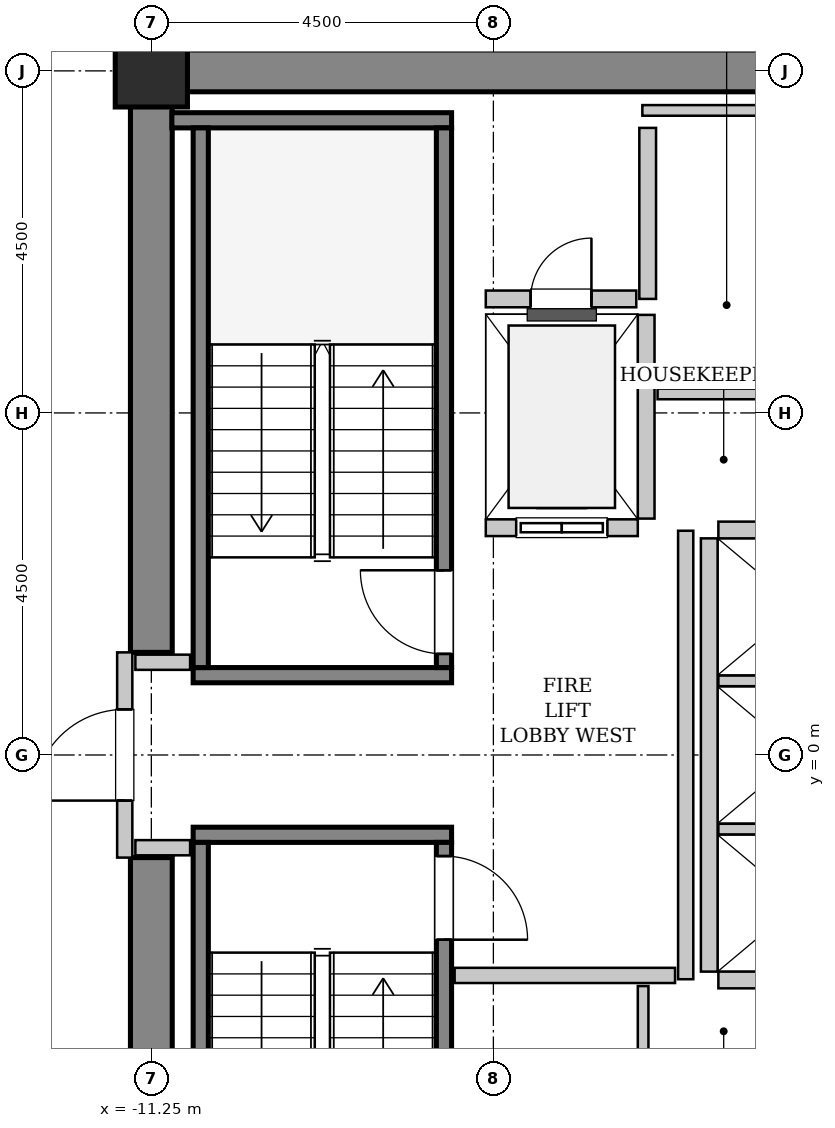
"""IFC4 building model, lengths in metres.
Left out: names, types, materials, properties, quantities, classifications, styles, units other than length and angle.
Written with IfcOpenShell. Run it as: python <this file> out.ifc"""

import sys

from ifc_helpers import new_model, si_unit, direction, frame, frame_2d, origin, origin_2d, place, context, subcontext, project, spatial, rectangle, hollow_rectangle, extrude, source, transform, mapped, element, fill, save


model = new_model("IFC4")
c1 = context("Model", 3, precision=1e-05, world=origin(), true_north=direction((0.0, 1.0)))
c2 = subcontext(c1, "Body", "Model", "MODEL_VIEW")
j1 = project(units=[si_unit("LENGTHUNIT", "METRE"), si_unit("PLANEANGLEUNIT", "RADIAN")], contexts=[c1])
p1 = place(None, origin())
s1 = spatial("IfcSite", under=j1, at=p1, CompositionType="ELEMENT")
p2 = place(p1, origin())
s2 = spatial("IfcBuilding", under=s1, at=p2, CompositionType="ELEMENT")
p3 = place(p2, frame((0.0, 0.0, 171.6)))
s3 = spatial("IfcBuildingStorey", under=s2, at=p3, CompositionType="ELEMENT", Elevation=171.6)
m1 = source(origin(), c2, "Body", "SweptSolid", [
    extrude(rectangle(XDim=9.975, YDim=0.55, at=frame_2d((4.987, 0.0))), origin(), (0.0, 0.0, 1.0), 3.8),
])
p4 = place(p3, frame((-11.525, 9.0, 0.0), z_axis=(0.0, 0.0, 1.0), x_axis=(1.0, 0.0, 0.0)))
e1 = element("IfcWall", 1, at=p4, inside=s3, PredefinedType="SHEAR", context=c2, shape_type="MappedRepresentation", body=[
    mapped(m1, transform((0.0, 0.0, 0.0), x_axis=(1.0, 0.0, 0.0), y_axis=(0.0, 1.0, 0.0), z_axis=(0.0, 0.0, 1.0), scale=1.0)),
])
m2 = source(origin(), c2, "Body", "SweptSolid", [
    extrude(rectangle(XDim=7.375, YDim=0.55, at=frame_2d((3.688, 0.0))), origin(), (0.0, 0.0, 1.0), 3.8),
])
for number, where, z_axis, x_axis in (
    (2, (-11.25, -8.725, 0.0), (0.0, 0.0, 1.0), (0.0, 1.0, 0.0)),
    (3, (-11.25, 1.35, 0.0), (0.0, 0.0, 1.0), (0.0, 1.0, 0.0)),
):
    element("IfcWall", number, at=place(p3, frame(where, z_axis=z_axis, x_axis=x_axis)), inside=s3, PredefinedType="SHEAR", context=c2, shape_type="MappedRepresentation", body=[
        mapped(m2, transform((0.0, 0.0, 0.0), x_axis=(1.0, 0.0, 0.0), y_axis=(0.0, 1.0, 0.0), z_axis=(0.0, 0.0, 1.0), scale=1.0)),
    ])
m3 = source(origin(), c2, "Body", "SweptSolid", [
    extrude(hollow_rectangle(XDim=0.95, YDim=0.95, WallThickness=0.045, InnerFilletRadius=0.045, OuterFilletRadius=0.09, at=origin_2d()), origin(), (0.0, 0.0, 1.0), 3.8),
])
p5 = place(p3, frame((-11.25, 9.0, 0.0), z_axis=(0.0, 0.0, 1.0), x_axis=(1.0, 0.0, 0.0)))
e4 = element("IfcColumn", 4, at=p5, inside=s3, PredefinedType="COLUMN", context=c2, shape_type="MappedRepresentation", body=[
    mapped(m3, transform((0.0, 0.0, 0.0), x_axis=(1.0, 0.0, 0.0), y_axis=(0.0, 1.0, 0.0), z_axis=(0.0, 0.0, 1.0), scale=1.0)),
])
m4 = source(origin(), c2, "Body", "SweptSolid", [
    extrude(rectangle(XDim=3.4, YDim=0.2, at=frame_2d((1.7, 0.0))), origin(), (0.0, 0.0, 1.0), 3.8),
])
p6 = place(p3, frame((-7.3, 1.05, 0.0), z_axis=(0.0, 0.0, 1.0), x_axis=(-1.0, 0.0, 0.0)))
e5 = element("IfcWall", 5, at=p6, inside=s3, PredefinedType="SOLIDWALL", context=c2, shape_type="MappedRepresentation", body=[
    mapped(m4, transform((0.0, 0.0, 0.0), x_axis=(1.0, 0.0, 0.0), y_axis=(0.0, 1.0, 0.0), z_axis=(0.0, 0.0, 1.0), scale=1.0)),
])
m5 = source(origin(), c2, "Body", "SweptSolid", [
    extrude(rectangle(XDim=3.68, YDim=0.2, at=frame_2d((1.84, 0.0))), origin(), (0.0, 0.0, 1.0), 3.8),
])
p7 = place(p3, frame((-7.3, 8.35, 0.0), z_axis=(0.0, 0.0, 1.0), x_axis=(-1.0, 0.0, 0.0)))
e6 = element("IfcWall", 6, at=p7, inside=s3, PredefinedType="SOLIDWALL", context=c2, shape_type="MappedRepresentation", body=[
    mapped(m5, transform((0.0, 0.0, 0.0), x_axis=(1.0, 0.0, 0.0), y_axis=(0.0, 1.0, 0.0), z_axis=(0.0, 0.0, 1.0), scale=1.0)),
])
m6 = source(origin(), c2, "Body", "SweptSolid", [
    extrude(rectangle(XDim=7.1, YDim=0.2, at=frame_2d((3.55, 0.0))), origin(), (0.0, 0.0, 1.0), 3.8),
])
p8 = place(p3, frame((-7.4, 1.15, 0.0), z_axis=(0.0, 0.0, 1.0), x_axis=(0.0, 1.0, 0.0)))
e7 = element("IfcWall", 7, at=p8, inside=s3, PredefinedType="SOLIDWALL", context=c2, shape_type="MappedRepresentation", body=[
    mapped(m6, transform((0.0, 0.0, 0.0), x_axis=(1.0, 0.0, 0.0), y_axis=(0.0, 1.0, 0.0), z_axis=(0.0, 0.0, 1.0), scale=1.0)),
])
p9 = place(p8, frame((0.18, 0.0, 0.0)))
e8 = element("IfcOpeningElement", 8, at=p9, cuts=e7, PredefinedType="OPENING", context=c2, shape_type="SweptSolid", body=[
    extrude(rectangle(XDim=1.1, YDim=2.15, at=frame_2d((0.55, 1.075))), frame((0.0, 0.11, 0.0), z_axis=(0.0, -1.0, 0.0), x_axis=(1.0, 0.0, 0.0)), (0.0, 0.0, 1.0), 0.22),
])
p10 = place(p3, frame((-10.6, 1.15, 0.0), z_axis=(0.0, 0.0, 1.0), x_axis=(0.0, 1.0, 0.0)))
e9 = element("IfcWall", 9, at=p10, inside=s3, PredefinedType="SOLIDWALL", context=c2, shape_type="MappedRepresentation", body=[
    mapped(m6, transform((0.0, 0.0, 0.0), x_axis=(1.0, 0.0, 0.0), y_axis=(0.0, 1.0, 0.0), z_axis=(0.0, 0.0, 1.0), scale=1.0)),
])
p11 = place(p3, frame((-10.7, -1.05, 0.0), z_axis=(0.0, 0.0, 1.0), x_axis=(1.0, 0.0, 0.0)))
e10 = element("IfcWall", 10, at=p11, inside=s3, PredefinedType="SOLIDWALL", context=c2, shape_type="MappedRepresentation", body=[
    mapped(m4, transform((0.0, 0.0, 0.0), x_axis=(1.0, 0.0, 0.0), y_axis=(0.0, 1.0, 0.0), z_axis=(0.0, 0.0, 1.0), scale=1.0)),
])
p12 = place(p3, frame((-10.6, -1.15, 0.0), z_axis=(0.0, 0.0, 1.0), x_axis=(0.0, -1.0, 0.0)))
e11 = element("IfcWall", 11, at=p12, inside=s3, PredefinedType="SOLIDWALL", context=c2, shape_type="MappedRepresentation", body=[
    mapped(m6, transform((0.0, 0.0, 0.0), x_axis=(1.0, 0.0, 0.0), y_axis=(0.0, 1.0, 0.0), z_axis=(0.0, 0.0, 1.0), scale=1.0)),
])
p13 = place(p3, frame((-7.4, -1.15, 0.0), z_axis=(0.0, 0.0, 1.0), x_axis=(0.0, -1.0, 0.0)))
e12 = element("IfcWall", 12, at=p13, inside=s3, PredefinedType="SOLIDWALL", context=c2, shape_type="MappedRepresentation", body=[
    mapped(m6, transform((0.0, 0.0, 0.0), x_axis=(1.0, 0.0, 0.0), y_axis=(0.0, 1.0, 0.0), z_axis=(0.0, 0.0, 1.0), scale=1.0)),
])
p14 = place(p13, frame((0.18, 0.0, 0.0)))
e13 = element("IfcOpeningElement", 13, at=p14, cuts=e12, PredefinedType="OPENING", context=c2, shape_type="SweptSolid", body=[
    extrude(rectangle(XDim=1.1, YDim=2.15, at=frame_2d((0.55, 1.075))), frame((0.0, 0.11, 0.0), z_axis=(0.0, -1.0, 0.0), x_axis=(1.0, 0.0, 0.0)), (0.0, 0.0, 1.0), 0.22),
])
m7 = source(origin(), c2, "Body", "SweptSolid", [
    extrude(rectangle(XDim=2.0, YDim=0.22, at=frame_2d((1.0, 0.0))), origin(), (0.0, 0.0, 1.0), 3.535),
])
p15 = place(p3, frame((-6.85, 2.99, 0.0), z_axis=(0.0, 0.0, 1.0), x_axis=(1.0, 0.0, 0.0)))
e14 = element("IfcWall", 14, at=p15, inside=s3, PredefinedType="SOLIDWALL", context=c2, shape_type="MappedRepresentation", body=[
    mapped(m7, transform((0.0, 0.0, 0.0), x_axis=(1.0, 0.0, 0.0), y_axis=(0.0, 1.0, 0.0), z_axis=(0.0, 0.0, 1.0), scale=1.0)),
])
p16 = place(p15, frame((0.4, 0.0, 0.0)))
e15 = element("IfcOpeningElement", 15, at=p16, cuts=e14, PredefinedType="OPENING", context=c2, shape_type="SweptSolid", body=[
    extrude(rectangle(XDim=1.2, YDim=2.2, at=frame_2d((0.6, 1.1))), frame((0.0, 0.12, 0.0), z_axis=(0.0, -1.0, 0.0), x_axis=(1.0, 0.0, 0.0)), (0.0, 0.0, 1.0), 0.24),
])
m8 = source(origin(), c2, "Body", "SweptSolid", [
    extrude(rectangle(XDim=2.68, YDim=0.22, at=frame_2d((1.34, 0.0))), origin(), (0.0, 0.0, 1.0), 3.535),
])
p17 = place(p3, frame((-4.74, 3.11, 0.0), z_axis=(0.0, 0.0, 1.0), x_axis=(0.0, 1.0, 0.0)))
e16 = element("IfcWall", 16, at=p17, inside=s3, PredefinedType="SOLIDWALL", context=c2, shape_type="MappedRepresentation", body=[
    mapped(m8, transform((0.0, 0.0, 0.0), x_axis=(1.0, 0.0, 0.0), y_axis=(0.0, 1.0, 0.0), z_axis=(0.0, 0.0, 1.0), scale=1.0)),
])
m9 = source(origin(), c2, "Body", "SweptSolid", [
    extrude(rectangle(XDim=5.7, YDim=0.22, at=frame_2d((2.85, 0.0))), origin(), (0.0, 0.0, 1.0), 3.535),
])
p18 = place(p3, frame((-3.91, 2.85, 0.0), z_axis=(0.0, 0.0, 1.0), x_axis=(0.0, -1.0, 0.0)))
e17 = element("IfcWall", 17, at=p18, inside=s3, PredefinedType="SOLIDWALL", context=c2, shape_type="MappedRepresentation", body=[
    mapped(m9, transform((0.0, 0.0, 0.0), x_axis=(1.0, 0.0, 0.0), y_axis=(0.0, 1.0, 0.0), z_axis=(0.0, 0.0, 1.0), scale=1.0)),
])
m10 = source(origin(), c2, "Body", "SweptSolid", [
    extrude(rectangle(XDim=2.13, YDim=0.22, at=frame_2d((1.065, 0.0))), origin(), (0.0, 0.0, 1.0), 3.535),
])
p19 = place(p3, frame((-3.79, -2.96, 0.0), z_axis=(0.0, 0.0, 1.0), x_axis=(1.0, 0.0, 0.0)))
e18 = element("IfcWall", 18, at=p19, inside=s3, PredefinedType="SOLIDWALL", context=c2, shape_type="MappedRepresentation", body=[
    mapped(m10, transform((0.0, 0.0, 0.0), x_axis=(1.0, 0.0, 0.0), y_axis=(0.0, 1.0, 0.0), z_axis=(0.0, 0.0, 1.0), scale=1.0)),
])
m11 = source(origin(), c2, "Body", "SweptSolid", [
    extrude(rectangle(XDim=2.13, YDim=0.14, at=frame_2d((1.065, 0.0))), origin(), (0.0, 0.0, 1.0), 3.535),
])
for number, where, z_axis, x_axis in (
    (19, (-3.79, -0.975, 0.0), (0.0, 0.0, 1.0), (1.0, 0.0, 0.0)),
    (20, (-3.79, 0.975, 0.0), (0.0, 0.0, 1.0), (1.0, 0.0, 0.0)),
):
    element("IfcWall", number, at=place(p3, frame(where, z_axis=z_axis, x_axis=x_axis)), inside=s3, PredefinedType="PARTITIONING", context=c2, shape_type="MappedRepresentation", body=[
        mapped(m11, transform((0.0, 0.0, 0.0), x_axis=(1.0, 0.0, 0.0), y_axis=(0.0, 1.0, 0.0), z_axis=(0.0, 0.0, 1.0), scale=1.0)),
    ])
p20 = place(p3, frame((-1.66, 2.96, 0.0), z_axis=(0.0, 0.0, 1.0), x_axis=(-1.0, 0.0, 0.0)))
e21 = element("IfcWall", 21, at=p20, inside=s3, PredefinedType="SOLIDWALL", context=c2, shape_type="MappedRepresentation", body=[
    mapped(m10, transform((0.0, 0.0, 0.0), x_axis=(1.0, 0.0, 0.0), y_axis=(0.0, 1.0, 0.0), z_axis=(0.0, 0.0, 1.0), scale=1.0)),
])
m12 = source(origin(), c2, "Body", "SweptSolid", [
    extrude(rectangle(XDim=2.25, YDim=0.22, at=frame_2d((1.125, 0.0))), origin(), (0.0, 0.0, 1.0), 3.535),
])
p21 = place(p3, frame((-4.72, 6.0, 0.0), z_axis=(0.0, 0.0, 1.0), x_axis=(0.0, 1.0, 0.0)))
e22 = element("IfcWall", 22, at=p21, inside=s3, PredefinedType="SOLIDWALL", context=c2, shape_type="MappedRepresentation", body=[
    mapped(m12, transform((0.0, 0.0, 0.0), x_axis=(1.0, 0.0, 0.0), y_axis=(0.0, 1.0, 0.0), z_axis=(0.0, 0.0, 1.0), scale=1.0)),
])
m13 = source(origin(), c2, "Body", "SweptSolid", [
    extrude(rectangle(XDim=1.98, YDim=0.22, at=frame_2d((0.99, 0.0))), origin(), (0.0, 0.0, 1.0), 3.535),
])
p22 = place(p3, frame((-6.85, 6.0, 0.0), z_axis=(0.0, 0.0, 1.0), x_axis=(1.0, 0.0, 0.0)))
e23 = element("IfcWall", 23, at=p22, inside=s3, PredefinedType="SOLIDWALL", context=c2, shape_type="MappedRepresentation", body=[
    mapped(m13, transform((0.0, 0.0, 0.0), x_axis=(1.0, 0.0, 0.0), y_axis=(0.0, 1.0, 0.0), z_axis=(0.0, 0.0, 1.0), scale=1.0)),
])
p23 = place(p22, frame((0.59, 0.0, 0.0)))
e24 = element("IfcOpeningElement", 24, at=p23, cuts=e23, PredefinedType="OPENING", context=c2, shape_type="SweptSolid", body=[
    extrude(rectangle(XDim=0.8, YDim=2.0, at=frame_2d((0.4, 1.0))), frame((0.0, 0.12, 0.0), z_axis=(0.0, -1.0, 0.0), x_axis=(1.0, 0.0, 0.0)), (0.0, 0.0, 1.0), 0.24),
])
m14 = source(origin(), c2, "Body", "SweptSolid", [
    extrude(rectangle(XDim=2.7, YDim=0.2, at=frame_2d((1.35, 0.0))), origin(), (0.0, 0.0, 1.0), 2.425),
])
p24 = place(p3, frame((-11.6, -1.35, 0.0), z_axis=(0.0, 0.0, 1.0), x_axis=(0.0, 1.0, 0.0)))
e25 = element("IfcWall", 25, at=p24, inside=s3, PredefinedType="PARTITIONING", context=c2, shape_type="MappedRepresentation", body=[
    mapped(m14, transform((0.0, 0.0, 0.0), x_axis=(1.0, 0.0, 0.0), y_axis=(0.0, 1.0, 0.0), z_axis=(0.0, 0.0, 1.0), scale=1.0)),
])
p25 = place(p24, frame((0.75, 0.0, 0.0)))
e26 = element("IfcOpeningElement", 26, at=p25, cuts=e25, PredefinedType="OPENING", context=c2, shape_type="SweptSolid", body=[
    extrude(rectangle(XDim=1.2, YDim=2.15, at=frame_2d((0.6, 1.075))), frame((0.0, 0.11, 0.0), z_axis=(0.0, -1.0, 0.0), x_axis=(1.0, 0.0, 0.0)), (0.0, 0.0, 1.0), 0.22),
])
m15 = source(origin(), c2, "Body", "SweptSolid", [
    extrude(rectangle(XDim=5.9, YDim=0.2, at=frame_2d((2.95, 0.0))), origin(), (0.0, 0.0, 1.0), 3.535),
])
p26 = place(p3, frame((-4.22, -2.95, 0.0), z_axis=(0.0, 0.0, 1.0), x_axis=(0.0, 1.0, 0.0)))
e27 = element("IfcWall", 27, at=p26, inside=s3, PredefinedType="PARTITIONING", context=c2, shape_type="MappedRepresentation", body=[
    mapped(m15, transform((0.0, 0.0, 0.0), x_axis=(1.0, 0.0, 0.0), y_axis=(0.0, 1.0, 0.0), z_axis=(0.0, 0.0, 1.0), scale=1.0)),
])
m16 = source(origin(), c2, "Body", "SweptSolid", [
    extrude(rectangle(XDim=2.9, YDim=0.2, at=frame_2d((1.45, 0.0))), origin(), (0.0, 0.0, 1.0), 3.535),
])
p27 = place(p3, frame((-7.26, -2.9, 0.0), z_axis=(0.0, 0.0, 1.0), x_axis=(1.0, 0.0, 0.0)))
e28 = element("IfcWall", 28, at=p27, inside=s3, PredefinedType="PARTITIONING", context=c2, shape_type="MappedRepresentation", body=[
    mapped(m16, transform((0.0, 0.0, 0.0), x_axis=(1.0, 0.0, 0.0), y_axis=(0.0, 1.0, 0.0), z_axis=(0.0, 0.0, 1.0), scale=1.0)),
])
m17 = source(origin(), c2, "Body", "SweptSolid", [
    extrude(rectangle(XDim=0.72, YDim=0.2, at=frame_2d((0.36, 0.0))), origin(), (0.0, 0.0, 1.0), 3.535),
])
for number, where, z_axis, x_axis in (
    (29, (-11.46, 1.22, 0.0), (0.0, 0.0, 1.0), (1.0, 0.0, 0.0)),
    (30, (-11.46, -1.22, 0.0), (0.0, 0.0, 1.0), (1.0, 0.0, 0.0)),
):
    element("IfcWall", number, at=place(p3, frame(where, z_axis=z_axis, x_axis=x_axis)), inside=s3, PredefinedType="PARTITIONING", context=c2, shape_type="MappedRepresentation", body=[
        mapped(m17, transform((0.0, 0.0, 0.0), x_axis=(1.0, 0.0, 0.0), y_axis=(0.0, 1.0, 0.0), z_axis=(0.0, 0.0, 1.0), scale=1.0)),
    ])
m18 = source(origin(), c2, "Body", "SweptSolid", [
    extrude(rectangle(XDim=2.95, YDim=0.14, at=frame_2d((1.475, 0.0))), origin(), (0.0, 0.0, 1.0), 3.535),
])
p28 = place(p3, frame((-4.59, 4.75, 0.0), z_axis=(0.0, 0.0, 1.0), x_axis=(1.0, 0.0, 0.0)))
e31 = element("IfcWall", 31, at=p28, inside=s3, PredefinedType="PARTITIONING", context=c2, shape_type="MappedRepresentation", body=[
    mapped(m18, transform((0.0, 0.0, 0.0), x_axis=(1.0, 0.0, 0.0), y_axis=(0.0, 1.0, 0.0), z_axis=(0.0, 0.0, 1.0), scale=1.0)),
])
m19 = source(origin(), c2, "Body", "SweptSolid", [
    extrude(rectangle(XDim=3.15, YDim=0.14, at=frame_2d((1.575, 0.0))), origin(), (0.0, 0.0, 1.0), 3.535),
])
p29 = place(p3, frame((-4.79, 8.48, 0.0), z_axis=(0.0, 0.0, 1.0), x_axis=(1.0, 0.0, 0.0)))
e32 = element("IfcWall", 32, at=p29, inside=s3, PredefinedType="PARTITIONING", context=c2, shape_type="MappedRepresentation", body=[
    mapped(m19, transform((0.0, 0.0, 0.0), x_axis=(1.0, 0.0, 0.0), y_axis=(0.0, 1.0, 0.0), z_axis=(0.0, 0.0, 1.0), scale=1.0)),
])
m20 = source(origin(), c2, "Body", "SweptSolid", [
    extrude(rectangle(XDim=1.1, YDim=0.14, at=frame_2d((0.55, 0.0))), origin(), (0.0, 0.0, 1.0), 3.535),
])
p30 = place(p3, frame((-4.78, -4.14, 0.0), z_axis=(0.0, 0.0, 1.0), x_axis=(0.0, 1.0, 0.0)))
e33 = element("IfcWall", 33, at=p30, inside=s3, PredefinedType="PARTITIONING", context=c2, shape_type="MappedRepresentation", body=[
    mapped(m20, transform((0.0, 0.0, 0.0), x_axis=(1.0, 0.0, 0.0), y_axis=(0.0, 1.0, 0.0), z_axis=(0.0, 0.0, 1.0), scale=1.0)),
])
m21 = source(origin(), c2, "Body", "SweptSolid", [
    extrude(rectangle(XDim=1.1, YDim=2.15, at=frame_2d((0.55, 1.075))), frame((0.0, 0.025, 0.0), z_axis=(0.0, -1.0, 0.0), x_axis=(1.0, 0.0, 0.0)), (0.0, 0.0, 1.0), 0.05),
])
p31 = place(p9, origin())
e34 = element("IfcDoor", 34, at=p31, inside=s3, OperationType="SINGLE_SWING_RIGHT", PredefinedType="DOOR", context=c2, shape_type="MappedRepresentation", body=[
    mapped(m21, transform((0.0, 0.0, 0.0), x_axis=(1.0, 0.0, 0.0), y_axis=(0.0, 1.0, 0.0), z_axis=(0.0, 0.0, 1.0), scale=1.0)),
])
fill(e8, e34)
p32 = place(p14, origin())
e35 = element("IfcDoor", 35, at=p32, inside=s3, OperationType="SINGLE_SWING_RIGHT", PredefinedType="DOOR", context=c2, shape_type="MappedRepresentation", body=[
    mapped(m21, transform((0.0, 0.0, 0.0), x_axis=(1.0, 0.0, 0.0), y_axis=(0.0, 1.0, 0.0), z_axis=(0.0, 0.0, 1.0), scale=1.0)),
])
fill(e13, e35)
m22 = source(origin(), c2, "Body", "SweptSolid", [
    extrude(rectangle(XDim=1.2, YDim=2.2, at=frame_2d((0.6, 1.1))), frame((0.0, 0.025, 0.0), z_axis=(0.0, -1.0, 0.0), x_axis=(1.0, 0.0, 0.0)), (0.0, 0.0, 1.0), 0.05),
])
p33 = place(p16, origin())
e36 = element("IfcDoor", 36, at=p33, inside=s3, OperationType="SLIDING_TO_LEFT", PredefinedType="DOOR", context=c2, shape_type="MappedRepresentation", body=[
    mapped(m22, transform((0.0, 0.0, 0.0), x_axis=(1.0, 0.0, 0.0), y_axis=(0.0, 1.0, 0.0), z_axis=(0.0, 0.0, 1.0), scale=1.0)),
])
fill(e15, e36)
m23 = source(origin(), c2, "Body", "SweptSolid", [
    extrude(rectangle(XDim=0.8, YDim=2.0, at=frame_2d((0.4, 1.0))), frame((0.0, 0.025, 0.0), z_axis=(0.0, -1.0, 0.0), x_axis=(1.0, 0.0, 0.0)), (0.0, 0.0, 1.0), 0.05),
])
p34 = place(p23, origin())
e37 = element("IfcDoor", 37, at=p34, inside=s3, OperationType="SINGLE_SWING_RIGHT", PredefinedType="TRAPDOOR", context=c2, shape_type="MappedRepresentation", body=[
    mapped(m23, transform((0.0, 0.0, 0.0), x_axis=(1.0, 0.0, 0.0), y_axis=(0.0, 1.0, 0.0), z_axis=(0.0, 0.0, 1.0), scale=1.0)),
])
fill(e24, e37)
m24 = source(origin(), c2, "Body", "SweptSolid", [
    extrude(rectangle(XDim=1.2, YDim=2.15, at=frame_2d((0.6, 1.075))), frame((0.0, 0.025, 0.0), z_axis=(0.0, -1.0, 0.0), x_axis=(1.0, 0.0, 0.0)), (0.0, 0.0, 1.0), 0.05),
])
p35 = place(p25, origin())
e38 = element("IfcDoor", 38, at=p35, inside=s3, OperationType="SINGLE_SWING_LEFT", PredefinedType="DOOR", context=c2, shape_type="MappedRepresentation", body=[
    mapped(m24, transform((0.0, 0.0, 0.0), x_axis=(1.0, 0.0, 0.0), y_axis=(0.0, 1.0, 0.0), z_axis=(0.0, 0.0, 1.0), scale=1.0)),
])
fill(e26, e38)
save(model, sys.argv[1])
